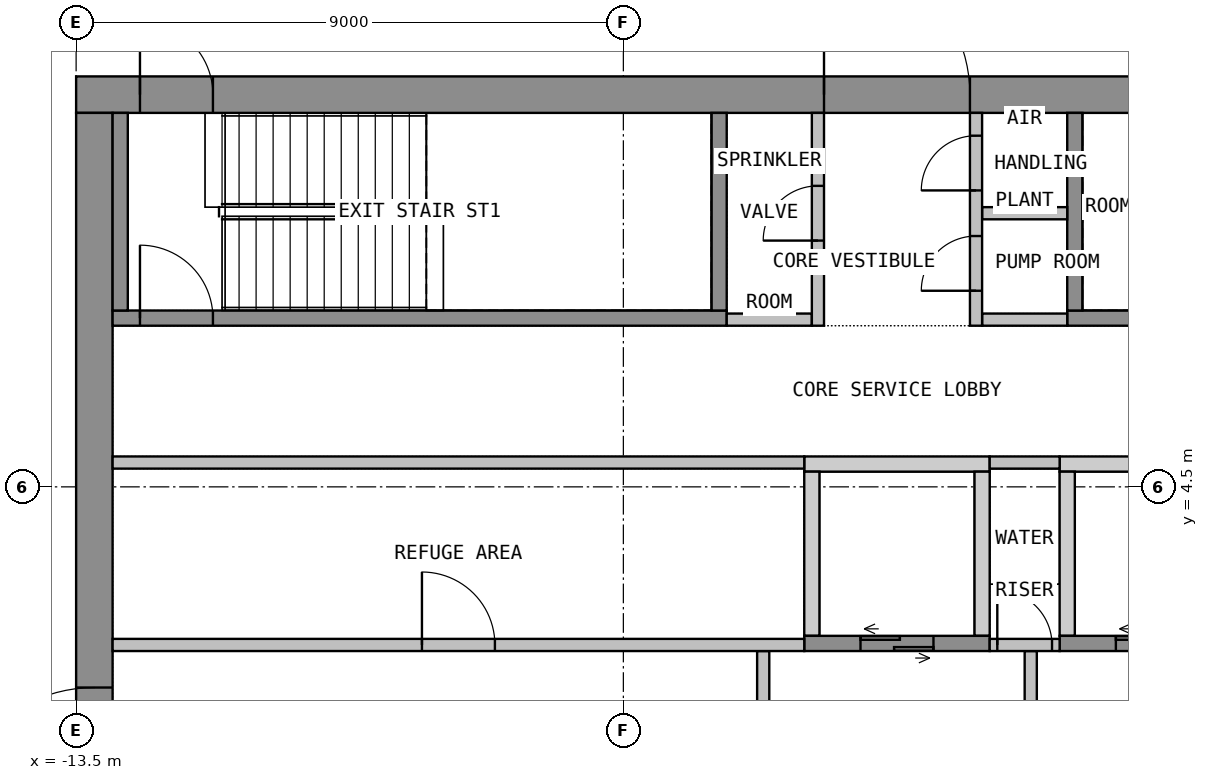
"""IFC4 building model, lengths in metres.
Left out: names, types, materials, properties, quantities, classifications, styles, units other than length and angle.
Written with IfcOpenShell. Run it as: python <this file> out.ifc"""

import sys

from ifc_helpers import new_model, si_unit, direction, frame, frame_2d, origin, place, context, subcontext, project, spatial, polyline, rectangle, outline, extrude, element, fill, save


model = new_model("IFC4")
c1 = context("Model", 3, precision=1e-05, world=origin(), true_north=direction((0.0, 1.0)))
c2 = subcontext(c1, "Body", "Model", "MODEL_VIEW")
j1 = project(units=[si_unit("LENGTHUNIT", "METRE"), si_unit("PLANEANGLEUNIT", "RADIAN")], contexts=[c1])
p1 = place(None, origin())
s1 = spatial("IfcSite", under=j1, at=p1, CompositionType="ELEMENT")
p2 = place(p1, origin())
s2 = spatial("IfcBuilding", under=s1, at=p2, CompositionType="ELEMENT")
p3 = place(p2, frame((0.0, 0.0, 282.0)))
s3 = spatial("IfcBuildingStorey", under=s2, at=p3, CompositionType="ELEMENT", Elevation=282.0)
p4 = place(p3, frame((-13.5, 10.95, 0.0), z_axis=(0.0, 0.0, 1.0), x_axis=(1.0, 0.0, 0.0)))
e1 = element("IfcWall", 1, at=p4, inside=s3, PredefinedType="SHEAR", context=c2, shape_type="SweptSolid", body=[
    extrude(rectangle(XDim=27.0, YDim=0.6, at=frame_2d((13.5, 0.0))), origin(), (0.0, 0.0, 1.0), 4.175),
])
p5 = place(p4, frame((12.3, 0.0, 0.0)))
e2 = element("IfcOpeningElement", 2, at=p5, cuts=e1, PredefinedType="OPENING", context=c2, shape_type="SweptSolid", body=[
    extrude(rectangle(XDim=2.4, YDim=2.1, at=frame_2d((1.2, 1.05))), frame((0.0, 0.31, 0.0), z_axis=(0.0, -1.0, 0.0), x_axis=(1.0, 0.0, 0.0)), (0.0, 0.0, 1.0), 0.62),
])
p6 = place(p4, frame((1.05, 0.0, 0.0)))
e3 = element("IfcOpeningElement", 3, at=p6, cuts=e1, PredefinedType="OPENING", context=c2, shape_type="SweptSolid", body=[
    extrude(rectangle(XDim=1.2, YDim=2.1, at=frame_2d((0.6, 1.05))), frame((0.0, 0.31, 0.0), z_axis=(0.0, -1.0, 0.0), x_axis=(1.0, 0.0, 0.0)), (0.0, 0.0, 1.0), 0.62),
])
p7 = place(p4, frame((24.75, 0.0, 0.0)))
e4 = element("IfcOpeningElement", 4, at=p7, cuts=e1, PredefinedType="OPENING", context=c2, shape_type="SweptSolid", body=[
    extrude(rectangle(XDim=1.2, YDim=2.1, at=frame_2d((0.6, 1.05))), frame((0.0, 0.31, 0.0), z_axis=(0.0, -1.0, 0.0), x_axis=(1.0, 0.0, 0.0)), (0.0, 0.0, 1.0), 0.62),
])
p8 = place(p3, frame((-13.2, -10.65, 0.0), z_axis=(0.0, 0.0, 1.0), x_axis=(0.0, 1.0, 0.0)))
e5 = element("IfcWall", 5, at=p8, inside=s3, PredefinedType="SHEAR", context=c2, shape_type="SweptSolid", body=[
    extrude(rectangle(XDim=21.3, YDim=0.6, at=frame_2d((10.65, 0.0))), origin(), (0.0, 0.0, 1.0), 4.175),
])
p9 = place(p8, frame((9.45, 0.0, 0.0)))
e6 = element("IfcOpeningElement", 6, at=p9, cuts=e5, PredefinedType="OPENING", context=c2, shape_type="SweptSolid", body=[
    extrude(rectangle(XDim=2.4, YDim=2.1, at=frame_2d((1.2, 1.05))), frame((0.0, 0.31, 0.0), z_axis=(0.0, -1.0, 0.0), x_axis=(1.0, 0.0, 0.0)), (0.0, 0.0, 1.0), 0.62),
])
p10 = place(p3, origin())
e7 = element("IfcWall", 7, at=p10, inside=s3, PredefinedType="SHEAR", context=c2, shape_type="SweptSolid", body=[
    extrude(outline(polyline([(-1.525, 4.75), (1.525, 4.75), (1.525, 5.0), (-1.525, 5.0), (-1.525, 4.75)])), origin(), (0.0, 0.0, 1.0), 4.175),
])
p11 = place(p3, origin())
e8 = element("IfcWall", 8, at=p11, inside=s3, PredefinedType="SHEAR", context=c2, shape_type="SweptSolid", body=[
    extrude(outline(polyline([(2.675, 4.75), (8.525, 4.75), (8.525, 5.0), (2.675, 5.0), (2.675, 4.75)])), origin(), (0.0, 0.0, 1.0), 4.175),
])
p12 = place(p3, origin())
e9 = element("IfcWall", 9, at=p12, inside=s3, PredefinedType="SHEAR", context=c2, shape_type="SweptSolid", body=[
    extrude(outline(polyline([(-1.525, 2.05), (-1.275, 2.05), (-1.275, 4.75), (-1.525, 4.75), (-1.525, 2.05)])), origin(), (0.0, 0.0, 1.0), 4.175),
])
p13 = place(p3, origin())
e10 = element("IfcWall", 10, at=p13, inside=s3, PredefinedType="SHEAR", context=c2, shape_type="SweptSolid", body=[
    extrude(outline(polyline([(1.275, 2.05), (1.525, 2.05), (1.525, 4.75), (1.275, 4.75), (1.275, 2.05)])), origin(), (0.0, 0.0, 1.0), 4.175),
])
p14 = place(p3, origin())
e11 = element("IfcWall", 11, at=p14, inside=s3, PredefinedType="SHEAR", context=c2, shape_type="SweptSolid", body=[
    extrude(outline(polyline([(2.675, 2.05), (2.925, 2.05), (2.925, 4.75), (2.675, 4.75), (2.675, 2.05)])), origin(), (0.0, 0.0, 1.0), 4.175),
])
p15 = place(p3, frame((-1.525, 1.925, 0.0), z_axis=(0.0, 0.0, 1.0), x_axis=(1.0, 0.0, 0.0)))
e12 = element("IfcWall", 12, at=p15, inside=s3, PredefinedType="SHEAR", context=c2, shape_type="SweptSolid", body=[
    extrude(rectangle(XDim=3.05, YDim=0.25, at=frame_2d((1.525, 0.0))), origin(), (0.0, 0.0, 1.0), 4.175),
])
p16 = place(p15, frame((0.925, 0.0, 0.0)))
e13 = element("IfcOpeningElement", 13, at=p16, cuts=e12, PredefinedType="OPENING", context=c2, shape_type="SweptSolid", body=[
    extrude(rectangle(XDim=1.2, YDim=2.1, at=frame_2d((0.6, 1.05))), frame((0.0, 0.135, 0.0), z_axis=(0.0, -1.0, 0.0), x_axis=(1.0, 0.0, 0.0)), (0.0, 0.0, 1.0), 0.27),
])
p17 = place(p3, frame((2.675, 1.925, 0.0), z_axis=(0.0, 0.0, 1.0), x_axis=(1.0, 0.0, 0.0)))
e14 = element("IfcWall", 14, at=p17, inside=s3, PredefinedType="SHEAR", context=c2, shape_type="SweptSolid", body=[
    extrude(rectangle(XDim=5.85, YDim=0.25, at=frame_2d((2.925, 0.0))), origin(), (0.0, 0.0, 1.0), 4.175),
])
p18 = place(p17, frame((0.925, 0.0, 0.0)))
e15 = element("IfcOpeningElement", 15, at=p18, cuts=e14, PredefinedType="OPENING", context=c2, shape_type="SweptSolid", body=[
    extrude(rectangle(XDim=1.2, YDim=2.1, at=frame_2d((0.6, 1.05))), frame((0.0, 0.135, 0.0), z_axis=(0.0, -1.0, 0.0), x_axis=(1.0, 0.0, 0.0)), (0.0, 0.0, 1.0), 0.27),
])
p19 = place(p17, frame((3.725, 0.0, 0.0)))
e16 = element("IfcOpeningElement", 16, at=p19, cuts=e14, PredefinedType="OPENING", context=c2, shape_type="SweptSolid", body=[
    extrude(rectangle(XDim=1.2, YDim=2.1, at=frame_2d((0.6, 1.05))), frame((0.0, 0.135, 0.0), z_axis=(0.0, -1.0, 0.0), x_axis=(1.0, 0.0, 0.0)), (0.0, 0.0, 1.0), 0.27),
])
p20 = place(p3, frame((-2.2, -1.8, 0.0), z_axis=(0.0, 0.0, 1.0), x_axis=(0.0, 1.0, 0.0)))
e17 = element("IfcWall", 17, at=p20, inside=s3, PredefinedType="PARTITIONING", context=c2, shape_type="SweptSolid", body=[
    extrude(rectangle(XDim=3.6, YDim=0.2, at=frame_2d((1.8, 0.0))), origin(), (0.0, 0.0, 1.0), 4.175),
])
p21 = place(p20, frame((1.2, 0.0, 0.0)))
e18 = element("IfcOpeningElement", 18, at=p21, cuts=e17, PredefinedType="OPENING", context=c2, shape_type="SweptSolid", body=[
    extrude(rectangle(XDim=1.2, YDim=2.1, at=frame_2d((0.6, 1.05))), frame((0.0, 0.11, 0.0), z_axis=(0.0, -1.0, 0.0), x_axis=(1.0, 0.0, 0.0)), (0.0, 0.0, 1.0), 0.22),
])
p22 = place(p3, frame((2.2, -1.8, 0.0), z_axis=(0.0, 0.0, 1.0), x_axis=(0.0, 1.0, 0.0)))
e19 = element("IfcWall", 19, at=p22, inside=s3, PredefinedType="PARTITIONING", context=c2, shape_type="SweptSolid", body=[
    extrude(rectangle(XDim=3.6, YDim=0.2, at=frame_2d((1.8, 0.0))), origin(), (0.0, 0.0, 1.0), 4.175),
])
p23 = place(p22, frame((1.2, 0.0, 0.0)))
e20 = element("IfcOpeningElement", 20, at=p23, cuts=e19, PredefinedType="OPENING", context=c2, shape_type="SweptSolid", body=[
    extrude(rectangle(XDim=1.2, YDim=2.1, at=frame_2d((0.6, 1.05))), frame((0.0, 0.11, 0.0), z_axis=(0.0, -1.0, 0.0), x_axis=(1.0, 0.0, 0.0)), (0.0, 0.0, 1.0), 0.22),
])
p24 = place(p3, frame((-12.9, 7.275, 0.0), z_axis=(0.0, 0.0, 1.0), x_axis=(1.0, 0.0, 0.0)))
e21 = element("IfcWall", 21, at=p24, inside=s3, PredefinedType="SHEAR", context=c2, shape_type="SweptSolid", body=[
    extrude(rectangle(XDim=10.1, YDim=0.25, at=frame_2d((5.05, 0.0))), origin(), (0.0, 0.0, 1.0), 4.175),
])
p25 = place(p24, frame((0.45, 0.0, 0.0)))
e22 = element("IfcOpeningElement", 22, at=p25, cuts=e21, PredefinedType="OPENING", context=c2, shape_type="SweptSolid", body=[
    extrude(rectangle(XDim=1.2, YDim=2.1, at=frame_2d((0.6, 1.05))), frame((0.0, 0.135, 0.0), z_axis=(0.0, -1.0, 0.0), x_axis=(1.0, 0.0, 0.0)), (0.0, 0.0, 1.0), 0.27),
])
for number, where, z_axis, x_axis in (
    (23, (-12.775, 7.4, 0.0), (0.0, 0.0, 1.0), (0.0, 1.0, 0.0)),
    (24, (-2.925, 7.4, 0.0), (0.0, 0.0, 1.0), (0.0, 1.0, 0.0)),
):
    element("IfcWall", number, at=place(p3, frame(where, z_axis=z_axis, x_axis=x_axis)), inside=s3, PredefinedType="SHEAR", context=c2, shape_type="SweptSolid", body=[
        extrude(rectangle(XDim=3.25, YDim=0.25, at=frame_2d((1.625, 0.0))), origin(), (0.0, 0.0, 1.0), 4.175),
    ])
p26 = place(p3, frame((2.8, 7.275, 0.0), z_axis=(0.0, 0.0, 1.0), x_axis=(1.0, 0.0, 0.0)))
e25 = element("IfcWall", 25, at=p26, inside=s3, PredefinedType="SHEAR", context=c2, shape_type="SweptSolid", body=[
    extrude(rectangle(XDim=10.1, YDim=0.25, at=frame_2d((5.05, 0.0))), origin(), (0.0, 0.0, 1.0), 4.175),
])
p27 = place(p26, frame((8.45, 0.0, 0.0)))
e26 = element("IfcOpeningElement", 26, at=p27, cuts=e25, PredefinedType="OPENING", context=c2, shape_type="SweptSolid", body=[
    extrude(rectangle(XDim=1.2, YDim=2.1, at=frame_2d((0.6, 1.05))), frame((0.0, 0.135, 0.0), z_axis=(0.0, -1.0, 0.0), x_axis=(1.0, 0.0, 0.0)), (0.0, 0.0, 1.0), 0.27),
])
p28 = place(p3, frame((2.925, 7.4, 0.0), z_axis=(0.0, 0.0, 1.0), x_axis=(0.0, 1.0, 0.0)))
e27 = element("IfcWall", 27, at=p28, inside=s3, PredefinedType="SHEAR", context=c2, shape_type="SweptSolid", body=[
    extrude(rectangle(XDim=3.25, YDim=0.25, at=frame_2d((1.625, 0.0))), origin(), (0.0, 0.0, 1.0), 4.175),
])
for number, where, z_axis, x_axis in (
    (28, (-2.8, 7.25, 0.0), (0.0, 0.0, 1.0), (1.0, 0.0, 0.0)),
    (29, (1.4, 7.25, 0.0), (0.0, 0.0, 1.0), (1.0, 0.0, 0.0)),
    (30, (1.4, 9.0, 0.0), (0.0, 0.0, 1.0), (1.0, 0.0, 0.0)),
):
    element("IfcWall", number, at=place(p3, frame(where, z_axis=z_axis, x_axis=x_axis)), inside=s3, PredefinedType="PARTITIONING", context=c2, shape_type="SweptSolid", body=[
        extrude(rectangle(XDim=1.4, YDim=0.2, at=frame_2d((0.7, 0.0))), origin(), (0.0, 0.0, 1.0), 4.175),
    ])
p29 = place(p3, frame((-1.3, 7.15, 0.0), z_axis=(0.0, 0.0, 1.0), x_axis=(0.0, 1.0, 0.0)))
e31 = element("IfcWall", 31, at=p29, inside=s3, PredefinedType="PARTITIONING", context=c2, shape_type="SweptSolid", body=[
    extrude(rectangle(XDim=3.5, YDim=0.2, at=frame_2d((1.75, 0.0))), origin(), (0.0, 0.0, 1.0), 4.175),
])
p30 = place(p29, frame((1.4, 0.0, 0.0)))
e32 = element("IfcOpeningElement", 32, at=p30, cuts=e31, PredefinedType="OPENING", context=c2, shape_type="SweptSolid", body=[
    extrude(rectangle(XDim=0.9, YDim=2.1, at=frame_2d((0.45, 1.05))), frame((0.0, 0.11, 0.0), z_axis=(0.0, -1.0, 0.0), x_axis=(1.0, 0.0, 0.0)), (0.0, 0.0, 1.0), 0.22),
])
p31 = place(p3, frame((1.3, 7.15, 0.0), z_axis=(0.0, 0.0, 1.0), x_axis=(0.0, 1.0, 0.0)))
e33 = element("IfcWall", 33, at=p31, inside=s3, PredefinedType="PARTITIONING", context=c2, shape_type="SweptSolid", body=[
    extrude(rectangle(XDim=3.5, YDim=0.2, at=frame_2d((1.75, 0.0))), origin(), (0.0, 0.0, 1.0), 4.175),
])
p32 = place(p31, frame((0.575, 0.0, 0.0)))
e34 = element("IfcOpeningElement", 34, at=p32, cuts=e33, PredefinedType="OPENING", context=c2, shape_type="SweptSolid", body=[
    extrude(rectangle(XDim=0.9, YDim=2.1, at=frame_2d((0.45, 1.05))), frame((0.0, 0.11, 0.0), z_axis=(0.0, -1.0, 0.0), x_axis=(1.0, 0.0, 0.0)), (0.0, 0.0, 1.0), 0.22),
])
p33 = place(p31, frame((2.225, 0.0, 0.0)))
e35 = element("IfcOpeningElement", 35, at=p33, cuts=e33, PredefinedType="OPENING", context=c2, shape_type="SweptSolid", body=[
    extrude(rectangle(XDim=0.9, YDim=2.1, at=frame_2d((0.45, 1.05))), frame((0.0, 0.11, 0.0), z_axis=(0.0, -1.0, 0.0), x_axis=(1.0, 0.0, 0.0)), (0.0, 0.0, 1.0), 0.22),
])
p34 = place(p3, frame((-12.9, 1.9, 0.0), z_axis=(0.0, 0.0, 1.0), x_axis=(1.0, 0.0, 0.0)))
e36 = element("IfcWall", 36, at=p34, inside=s3, PredefinedType="PARTITIONING", context=c2, shape_type="SweptSolid", body=[
    extrude(rectangle(XDim=11.375, YDim=0.2, at=frame_2d((5.688, 0.0))), origin(), (0.0, 0.0, 1.0), 4.175),
])
p35 = place(p34, frame((5.087, 0.0, 0.0)))
e37 = element("IfcOpeningElement", 37, at=p35, cuts=e36, PredefinedType="OPENING", context=c2, shape_type="SweptSolid", body=[
    extrude(rectangle(XDim=1.2, YDim=2.1, at=frame_2d((0.6, 1.05))), frame((0.0, 0.11, 0.0), z_axis=(0.0, -1.0, 0.0), x_axis=(1.0, 0.0, 0.0)), (0.0, 0.0, 1.0), 0.22),
])
p36 = place(p3, frame((-12.9, 4.9, 0.0), z_axis=(0.0, 0.0, 1.0), x_axis=(1.0, 0.0, 0.0)))
e38 = element("IfcWall", 38, at=p36, inside=s3, PredefinedType="PARTITIONING", context=c2, shape_type="SweptSolid", body=[
    extrude(rectangle(XDim=11.375, YDim=0.2, at=frame_2d((5.688, 0.0))), origin(), (0.0, 0.0, 1.0), 4.175),
])
p37 = place(p3, frame((1.525, 1.9, 0.0), z_axis=(0.0, 0.0, 1.0), x_axis=(1.0, 0.0, 0.0)))
e39 = element("IfcWall", 39, at=p37, inside=s3, PredefinedType="PARTITIONING", context=c2, shape_type="SweptSolid", body=[
    extrude(rectangle(XDim=1.15, YDim=0.2, at=frame_2d((0.575, 0.0))), origin(), (0.0, 0.0, 1.0), 4.175),
])
p38 = place(p37, frame((0.125, 0.0, 0.0)))
e40 = element("IfcOpeningElement", 40, at=p38, cuts=e39, PredefinedType="OPENING", context=c2, shape_type="SweptSolid", body=[
    extrude(rectangle(XDim=0.9, YDim=2.1, at=frame_2d((0.45, 1.05))), frame((0.0, 0.11, 0.0), z_axis=(0.0, -1.0, 0.0), x_axis=(1.0, 0.0, 0.0)), (0.0, 0.0, 1.0), 0.22),
])
p39 = place(p3, frame((1.525, 4.9, 0.0), z_axis=(0.0, 0.0, 1.0), x_axis=(1.0, 0.0, 0.0)))
e41 = element("IfcWall", 41, at=p39, inside=s3, PredefinedType="PARTITIONING", context=c2, shape_type="SweptSolid", body=[
    extrude(rectangle(XDim=1.15, YDim=0.2, at=frame_2d((0.575, 0.0))), origin(), (0.0, 0.0, 1.0), 4.175),
])
p40 = place(p9, origin())
e42 = element("IfcDoor", 42, at=p40, inside=s3, OperationType="DOUBLE_DOOR_DOUBLE_SWING", PredefinedType="DOOR", context=c2, shape_type="SweptSolid", body=[
    extrude(rectangle(XDim=2.4, YDim=2.1, at=frame_2d((1.2, 1.05))), frame((0.0, 0.025, 0.0), z_axis=(0.0, -1.0, 0.0), x_axis=(1.0, 0.0, 0.0)), (0.0, 0.0, 1.0), 0.05),
])
fill(e6, e42)
p41 = place(p5, origin())
e43 = element("IfcDoor", 43, at=p41, inside=s3, OperationType="DOUBLE_DOOR_DOUBLE_SWING", PredefinedType="DOOR", context=c2, shape_type="SweptSolid", body=[
    extrude(rectangle(XDim=2.4, YDim=2.1, at=frame_2d((1.2, 1.05))), frame((0.0, 0.025, 0.0), z_axis=(0.0, -1.0, 0.0), x_axis=(1.0, 0.0, 0.0)), (0.0, 0.0, 1.0), 0.05),
])
fill(e2, e43)
p42 = place(p6, origin())
e44 = element("IfcDoor", 44, at=p42, inside=s3, OperationType="SINGLE_SWING_RIGHT", PredefinedType="DOOR", context=c2, shape_type="SweptSolid", body=[
    extrude(rectangle(XDim=1.2, YDim=2.1, at=frame_2d((0.6, 1.05))), frame((0.0, 0.025, 0.0), z_axis=(0.0, -1.0, 0.0), x_axis=(1.0, 0.0, 0.0)), (0.0, 0.0, 1.0), 0.05),
])
fill(e3, e44)
p43 = place(p16, origin())
e45 = element("IfcDoor", 45, at=p43, inside=s3, OperationType="DOUBLE_DOOR_SLIDING", PredefinedType="DOOR", context=c2, shape_type="SweptSolid", body=[
    extrude(rectangle(XDim=1.2, YDim=2.1, at=frame_2d((0.6, 1.05))), frame((0.0, 0.025, 0.0), z_axis=(0.0, -1.0, 0.0), x_axis=(1.0, 0.0, 0.0)), (0.0, 0.0, 1.0), 0.05),
])
fill(e13, e45)
p44 = place(p18, origin())
e46 = element("IfcDoor", 46, at=p44, inside=s3, OperationType="DOUBLE_DOOR_SLIDING", PredefinedType="DOOR", context=c2, shape_type="SweptSolid", body=[
    extrude(rectangle(XDim=1.2, YDim=2.1, at=frame_2d((0.6, 1.05))), frame((0.0, 0.025, 0.0), z_axis=(0.0, -1.0, 0.0), x_axis=(1.0, 0.0, 0.0)), (0.0, 0.0, 1.0), 0.05),
])
fill(e15, e46)
p45 = place(p25, origin())
e47 = element("IfcDoor", 47, at=p45, inside=s3, OperationType="SINGLE_SWING_LEFT", PredefinedType="DOOR", context=c2, shape_type="SweptSolid", body=[
    extrude(rectangle(XDim=1.2, YDim=2.1, at=frame_2d((0.6, 1.05))), frame((0.0, 0.025, 0.0), z_axis=(0.0, -1.0, 0.0), x_axis=(1.0, 0.0, 0.0)), (0.0, 0.0, 1.0), 0.05),
])
fill(e22, e47)
p46 = place(p30, origin())
e48 = element("IfcDoor", 48, at=p46, inside=s3, OperationType="SINGLE_SWING_LEFT", PredefinedType="DOOR", context=c2, shape_type="SweptSolid", body=[
    extrude(rectangle(XDim=0.9, YDim=2.1, at=frame_2d((0.45, 1.05))), frame((0.0, 0.025, 0.0), z_axis=(0.0, -1.0, 0.0), x_axis=(1.0, 0.0, 0.0)), (0.0, 0.0, 1.0), 0.05),
])
fill(e32, e48)
p47 = place(p32, origin())
e49 = element("IfcDoor", 49, at=p47, inside=s3, OperationType="SINGLE_SWING_LEFT", PredefinedType="DOOR", context=c2, shape_type="SweptSolid", body=[
    extrude(rectangle(XDim=0.9, YDim=2.1, at=frame_2d((0.45, 1.05))), frame((0.0, 0.025, 0.0), z_axis=(0.0, -1.0, 0.0), x_axis=(1.0, 0.0, 0.0)), (0.0, 0.0, 1.0), 0.05),
])
fill(e34, e49)
p48 = place(p33, origin())
e50 = element("IfcDoor", 50, at=p48, inside=s3, OperationType="SINGLE_SWING_LEFT", PredefinedType="DOOR", context=c2, shape_type="SweptSolid", body=[
    extrude(rectangle(XDim=0.9, YDim=2.1, at=frame_2d((0.45, 1.05))), frame((0.0, 0.025, 0.0), z_axis=(0.0, -1.0, 0.0), x_axis=(1.0, 0.0, 0.0)), (0.0, 0.0, 1.0), 0.05),
])
fill(e35, e50)
p49 = place(p35, origin())
e51 = element("IfcDoor", 51, at=p49, inside=s3, OperationType="SINGLE_SWING_RIGHT", PredefinedType="DOOR", context=c2, shape_type="SweptSolid", body=[
    extrude(rectangle(XDim=1.2, YDim=2.1, at=frame_2d((0.6, 1.05))), frame((0.0, 0.025, 0.0), z_axis=(0.0, -1.0, 0.0), x_axis=(1.0, 0.0, 0.0)), (0.0, 0.0, 1.0), 0.05),
])
fill(e37, e51)
p50 = place(p38, origin())
e52 = element("IfcDoor", 52, at=p50, inside=s3, OperationType="SINGLE_SWING_LEFT", PredefinedType="DOOR", context=c2, shape_type="SweptSolid", body=[
    extrude(rectangle(XDim=0.9, YDim=2.1, at=frame_2d((0.45, 1.05))), frame((0.0, 0.025, 0.0), z_axis=(0.0, -1.0, 0.0), x_axis=(1.0, 0.0, 0.0)), (0.0, 0.0, 1.0), 0.05),
])
fill(e40, e52)
save(model, sys.argv[1])
